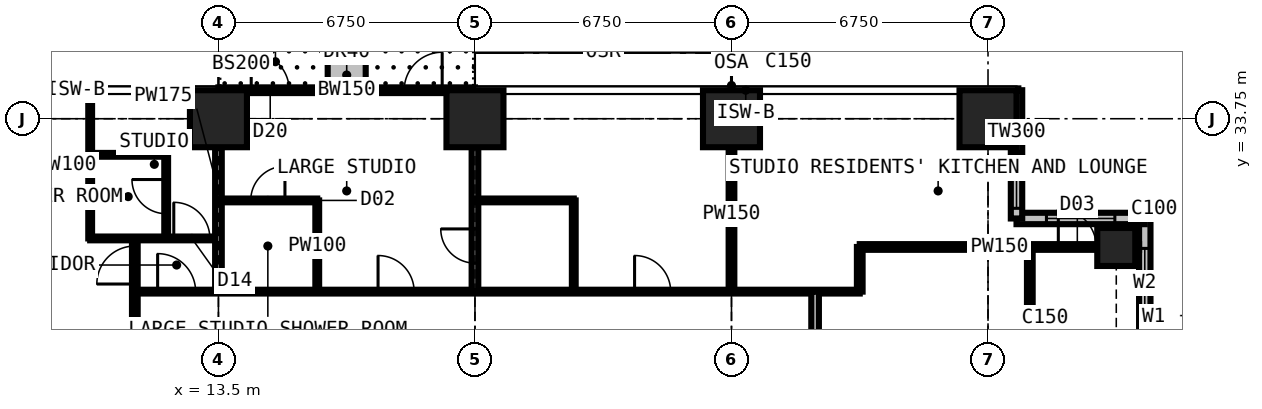
"""IFC4 building model, lengths in metres.
Left out: names, types, materials, properties, quantities, classifications, styles, units other than length and angle.
Written with IfcOpenShell. Run it as: python <this file> out.ifc"""

import sys

from ifc_helpers import new_model, si_unit, direction, frame, frame_2d, origin, origin_2d, place, context, subcontext, project, spatial, rectangle, extrude, element, fill, save


model = new_model("IFC4")
c1 = context("Model", 3, precision=1e-05, world=origin(), true_north=direction((0.0, 1.0)))
c2 = subcontext(c1, "Body", "Model", "MODEL_VIEW")
j1 = project(units=[si_unit("LENGTHUNIT", "METRE"), si_unit("PLANEANGLEUNIT", "RADIAN")], contexts=[c1])
p1 = place(None, origin())
s1 = spatial("IfcSite", under=j1, at=p1, CompositionType="ELEMENT")
p2 = place(p1, origin())
s2 = spatial("IfcBuilding", under=s1, at=p2, CompositionType="ELEMENT")
p3 = place(p2, frame((0.0, 0.0, 123.3)))
s3 = spatial("IfcBuildingStorey", under=s2, at=p3, CompositionType="ELEMENT", Elevation=123.3)
for number, where, z_axis, x_axis in (
    (1, (13.5, 33.75, 0.0), (0.0, 0.0, 1.0), (1.0, 0.0, 0.0)),
    (2, (20.25, 33.75, 0.0), (0.0, 0.0, 1.0), (1.0, 0.0, 0.0)),
    (3, (27.0, 33.75, 0.0), (0.0, 0.0, 1.0), (1.0, 0.0, 0.0)),
    (4, (33.75, 33.75, 0.0), (0.0, 0.0, 1.0), (1.0, 0.0, 0.0)),
):
    element("IfcColumn", number, at=place(p3, frame(where, z_axis=z_axis, x_axis=x_axis)), inside=s3, PredefinedType="COLUMN", context=c2, shape_type="SweptSolid", body=[
        extrude(rectangle(XDim=1.5, YDim=1.5, at=origin_2d()), origin(), (0.0, 0.0, 1.0), 3.6),
    ])
p4 = place(p3, frame((37.125, 30.375, 0.0), z_axis=(0.0, 0.0, 1.0), x_axis=(1.0, 0.0, 0.0)))
e5 = element("IfcColumn", 5, at=p4, inside=s3, PredefinedType="COLUMN", context=c2, shape_type="SweptSolid", body=[
    extrude(rectangle(XDim=1.0, YDim=1.0, at=origin_2d()), origin(), (0.0, 0.0, 1.0), 3.6),
])
p5 = place(p3, frame((37.875, 27.75, 0.0), z_axis=(0.0, 0.0, 1.0), x_axis=(0.0, 1.0, 0.0)))
e6 = element("IfcWall", 6, at=p5, inside=s3, PredefinedType="SOLIDWALL", context=c2, shape_type="SweptSolid", body=[
    extrude(rectangle(XDim=3.375, YDim=0.3, at=frame_2d((1.688, 0.0))), origin(), (0.0, 0.0, 1.0), 3.375),
])
p6 = place(p5, frame((0.788, 0.0, 0.6)))
e7 = element("IfcOpeningElement", 7, at=p6, cuts=e6, PredefinedType="OPENING", context=c2, shape_type="SweptSolid", body=[
    extrude(rectangle(XDim=1.8, YDim=2.1, at=frame_2d((0.9, 1.05))), frame((0.0, 0.16, 0.0), z_axis=(0.0, -1.0, 0.0), x_axis=(1.0, 0.0, 0.0)), (0.0, 0.0, 1.0), 0.32),
])
p7 = place(p3, frame((37.875, 31.125, 0.0), z_axis=(0.0, 0.0, 1.0), x_axis=(-1.0, 0.0, 0.0)))
e8 = element("IfcWall", 8, at=p7, inside=s3, PredefinedType="SOLIDWALL", context=c2, shape_type="SweptSolid", body=[
    extrude(rectangle(XDim=3.375, YDim=0.3, at=frame_2d((1.688, 0.0))), origin(), (0.0, 0.0, 1.0), 3.375),
])
p8 = place(p7, frame((0.788, 0.0, 0.6)))
e9 = element("IfcOpeningElement", 9, at=p8, cuts=e8, PredefinedType="OPENING", context=c2, shape_type="SweptSolid", body=[
    extrude(rectangle(XDim=1.8, YDim=2.1, at=frame_2d((0.9, 1.05))), frame((0.0, 0.16, 0.0), z_axis=(0.0, -1.0, 0.0), x_axis=(1.0, 0.0, 0.0)), (0.0, 0.0, 1.0), 0.32),
])
p9 = place(p3, frame((34.5, 31.125, 0.0), z_axis=(0.0, 0.0, 1.0), x_axis=(0.0, 1.0, 0.0)))
e10 = element("IfcWall", 10, at=p9, inside=s3, PredefinedType="SOLIDWALL", context=c2, shape_type="SweptSolid", body=[
    extrude(rectangle(XDim=3.375, YDim=0.3, at=frame_2d((1.688, 0.0))), origin(), (0.0, 0.0, 1.0), 3.375),
])
p10 = place(p9, frame((0.268, 0.0, 0.9)))
e11 = element("IfcOpeningElement", 11, at=p10, cuts=e10, PredefinedType="OPENING", context=c2, shape_type="SweptSolid", body=[
    extrude(rectangle(XDim=1.5, YDim=1.8, at=frame_2d((0.75, 0.9))), frame((0.0, 0.16, 0.0), z_axis=(0.0, -1.0, 0.0), x_axis=(1.0, 0.0, 0.0)), (0.0, 0.0, 1.0), 0.32),
])
p11 = place(p3, frame((13.5, 34.5, 0.0), z_axis=(0.0, 0.0, 1.0), x_axis=(1.0, 0.0, 0.0)))
e12 = element("IfcWall", 12, at=p11, inside=s3, PredefinedType="SOLIDWALL", context=c2, shape_type="SweptSolid", body=[
    extrude(rectangle(XDim=6.75, YDim=0.15, at=frame_2d((3.375, 0.0))), origin(), (0.0, 0.0, 1.0), 3.375),
])
p12 = place(p11, frame((0.863, 0.0, 0.0)))
e13 = element("IfcOpeningElement", 13, at=p12, cuts=e12, PredefinedType="OPENING", context=c2, shape_type="SweptSolid", body=[
    extrude(rectangle(XDim=1.0, YDim=2.2, at=frame_2d((0.5, 1.1))), frame((0.0, 0.085, 0.0), z_axis=(0.0, -1.0, 0.0), x_axis=(1.0, 0.0, 0.0)), (0.0, 0.0, 1.0), 0.17),
])
p13 = place(p11, frame((1.975, 0.0, 0.9)))
e14 = element("IfcOpeningElement", 14, at=p13, cuts=e12, PredefinedType="OPENING", context=c2, shape_type="SweptSolid", body=[
    extrude(rectangle(XDim=1.2, YDim=1.8, at=frame_2d((0.6, 0.9))), frame((0.0, 0.085, 0.0), z_axis=(0.0, -1.0, 0.0), x_axis=(1.0, 0.0, 0.0)), (0.0, 0.0, 1.0), 0.17),
])
p14 = place(p11, frame((4.887, 0.0, 0.0)))
e15 = element("IfcOpeningElement", 15, at=p14, cuts=e12, PredefinedType="OPENING", context=c2, shape_type="SweptSolid", body=[
    extrude(rectangle(XDim=1.0, YDim=2.2, at=frame_2d((0.5, 1.1))), frame((0.0, 0.085, 0.0), z_axis=(0.0, -1.0, 0.0), x_axis=(1.0, 0.0, 0.0)), (0.0, 0.0, 1.0), 0.17),
])
p15 = place(p11, frame((3.575, 0.0, 0.9)))
e16 = element("IfcOpeningElement", 16, at=p15, cuts=e12, PredefinedType="OPENING", context=c2, shape_type="SweptSolid", body=[
    extrude(rectangle(XDim=1.2, YDim=1.8, at=frame_2d((0.6, 0.9))), frame((0.0, 0.085, 0.0), z_axis=(0.0, -1.0, 0.0), x_axis=(1.0, 0.0, 0.0)), (0.0, 0.0, 1.0), 0.17),
])
p16 = place(p3, frame((16.875, 34.6, 0.0), z_axis=(0.0, 0.0, 1.0), x_axis=(0.0, 1.0, 0.0)))
e17 = element("IfcWall", 17, at=p16, inside=s3, PredefinedType="USERDEFINED", context=c2, shape_type="SweptSolid", body=[
    extrude(rectangle(XDim=2.2, YDim=1.0, at=frame_2d((1.1, 0.0))), origin(), (0.0, 0.0, 1.0), 0.9),
])
p17 = place(p3, frame((10.125, 30.6, 0.0), z_axis=(0.0, 0.0, 1.0), x_axis=(0.0, 1.0, 0.0)))
e18 = element("IfcWall", 18, at=p17, inside=s3, PredefinedType="PARTITIONING", context=c2, shape_type="SweptSolid", body=[
    extrude(rectangle(XDim=3.884, YDim=0.1, at=frame_2d((1.942, 0.0))), origin(), (0.0, 0.0, 1.0), 3.375),
])
p18 = place(p3, frame((10.125, 30.6, 0.0), z_axis=(0.0, 0.0, 1.0), x_axis=(1.0, 0.0, 0.0)))
e19 = element("IfcWall", 19, at=p18, inside=s3, PredefinedType="PARTITIONING", context=c2, shape_type="SweptSolid", body=[
    extrude(rectangle(XDim=3.375, YDim=0.1, at=frame_2d((1.688, 0.0))), origin(), (0.0, 0.0, 1.0), 3.375),
])
p19 = place(p18, frame((2.2, 0.0, 0.0)))
e20 = element("IfcOpeningElement", 20, at=p19, cuts=e19, PredefinedType="OPENING", context=c2, shape_type="SweptSolid", body=[
    extrude(rectangle(XDim=0.95, YDim=2.2, at=frame_2d((0.475, 1.1))), frame((0.0, 0.06, 0.0), z_axis=(0.0, -1.0, 0.0), x_axis=(1.0, 0.0, 0.0)), (0.0, 0.0, 1.0), 0.12),
])
p20 = place(p3, frame((10.125, 32.8, 0.0), z_axis=(0.0, 0.0, 1.0), x_axis=(1.0, 0.0, 0.0)))
e21 = element("IfcWall", 21, at=p20, inside=s3, PredefinedType="PARTITIONING", context=c2, shape_type="SweptSolid", body=[
    extrude(rectangle(XDim=2.0, YDim=0.1, at=frame_2d((1.0, 0.0))), origin(), (0.0, 0.0, 1.0), 3.375),
])
p21 = place(p3, frame((11.3, 11.3, 0.0), z_axis=(0.0, 0.0, 1.0), x_axis=(0.0, 1.0, 0.0)))
e22 = element("IfcWall", 22, at=p21, inside=s3, PredefinedType="PARTITIONING", context=c2, shape_type="SweptSolid", body=[
    extrude(rectangle(XDim=19.3, YDim=0.15, at=frame_2d((9.65, 0.0))), origin(), (0.0, 0.0, 1.0), 3.375),
])
p22 = place(p21, frame((18.1, 0.0, 0.0)))
e23 = element("IfcOpeningElement", 23, at=p22, cuts=e22, PredefinedType="OPENING", context=c2, shape_type="SweptSolid", body=[
    extrude(rectangle(XDim=1.0, YDim=2.2, at=frame_2d((0.5, 1.1))), frame((0.0, 0.085, 0.0), z_axis=(0.0, -1.0, 0.0), x_axis=(1.0, 0.0, 0.0)), (0.0, 0.0, 1.0), 0.17),
])
p23 = place(p21, frame((10.137, 0.0, 0.0)))
e24 = element("IfcOpeningElement", 24, at=p23, cuts=e22, PredefinedType="OPENING", context=c2, shape_type="SweptSolid", body=[
    extrude(rectangle(XDim=1.0, YDim=2.2, at=frame_2d((0.5, 1.1))), frame((0.0, 0.085, 0.0), z_axis=(0.0, -1.0, 0.0), x_axis=(1.0, 0.0, 0.0)), (0.0, 0.0, 1.0), 0.17),
])
p24 = place(p3, frame((11.3, 29.2, 0.0), z_axis=(0.0, 0.0, 1.0), x_axis=(1.0, 0.0, 0.0)))
e25 = element("IfcWall", 25, at=p24, inside=s3, PredefinedType="PARTITIONING", context=c2, shape_type="SweptSolid", body=[
    extrude(rectangle(XDim=19.075, YDim=0.1, at=frame_2d((9.538, 0.0))), origin(), (0.0, 0.0, 1.0), 3.375),
])
p25 = place(p24, frame((6.4, 0.0, 0.0)))
e26 = element("IfcOpeningElement", 26, at=p25, cuts=e25, PredefinedType="OPENING", context=c2, shape_type="SweptSolid", body=[
    extrude(rectangle(XDim=0.95, YDim=2.2, at=frame_2d((0.475, 1.1))), frame((0.0, 0.06, 0.0), z_axis=(0.0, -1.0, 0.0), x_axis=(1.0, 0.0, 0.0)), (0.0, 0.0, 1.0), 0.12),
])
p26 = place(p24, frame((13.15, 0.0, 0.0)))
e27 = element("IfcOpeningElement", 27, at=p26, cuts=e25, PredefinedType="OPENING", context=c2, shape_type="SweptSolid", body=[
    extrude(rectangle(XDim=0.95, YDim=2.2, at=frame_2d((0.475, 1.1))), frame((0.0, 0.06, 0.0), z_axis=(0.0, -1.0, 0.0), x_axis=(1.0, 0.0, 0.0)), (0.0, 0.0, 1.0), 0.12),
])
p27 = place(p24, frame((0.6, 0.0, 0.0)))
e28 = element("IfcOpeningElement", 28, at=p27, cuts=e25, PredefinedType="OPENING", context=c2, shape_type="SweptSolid", body=[
    extrude(rectangle(XDim=1.0, YDim=2.2, at=frame_2d((0.5, 1.1))), frame((0.0, 0.06, 0.0), z_axis=(0.0, -1.0, 0.0), x_axis=(1.0, 0.0, 0.0)), (0.0, 0.0, 1.0), 0.12),
])
p28 = place(p3, frame((12.125, 30.6, 0.0), z_axis=(0.0, 0.0, 1.0), x_axis=(0.0, 1.0, 0.0)))
e29 = element("IfcWall", 29, at=p28, inside=s3, PredefinedType="PARTITIONING", context=c2, shape_type="SweptSolid", body=[
    extrude(rectangle(XDim=2.2, YDim=0.1, at=frame_2d((1.1, 0.0))), origin(), (0.0, 0.0, 1.0), 3.375),
])
p29 = place(p28, frame((0.65, 0.0, 0.0)))
e30 = element("IfcOpeningElement", 30, at=p29, cuts=e29, PredefinedType="OPENING", context=c2, shape_type="SweptSolid", body=[
    extrude(rectangle(XDim=0.9, YDim=2.2, at=frame_2d((0.45, 1.1))), frame((0.0, 0.06, 0.0), z_axis=(0.0, -1.0, 0.0), x_axis=(1.0, 0.0, 0.0)), (0.0, 0.0, 1.0), 0.12),
])
p30 = place(p3, frame((13.5, 29.2, 0.0), z_axis=(0.0, 0.0, 1.0), x_axis=(0.0, 1.0, 0.0)))
e31 = element("IfcWall", 31, at=p30, inside=s3, PredefinedType="PARTITIONING", context=c2, shape_type="SweptSolid", body=[
    extrude(rectangle(XDim=5.284, YDim=0.175, at=frame_2d((2.642, 0.0))), origin(), (0.0, 0.0, 1.0), 2.806),
])
p31 = place(p3, frame((13.5, 31.6, 0.0), z_axis=(0.0, 0.0, 1.0), x_axis=(1.0, 0.0, 0.0)))
e32 = element("IfcWall", 32, at=p31, inside=s3, PredefinedType="PARTITIONING", context=c2, shape_type="SweptSolid", body=[
    extrude(rectangle(XDim=2.6, YDim=0.1, at=frame_2d((1.3, 0.0))), origin(), (0.0, 0.0, 1.0), 3.375),
])
p32 = place(p31, frame((0.85, 0.0, 0.0)))
e33 = element("IfcOpeningElement", 33, at=p32, cuts=e32, PredefinedType="OPENING", context=c2, shape_type="SweptSolid", body=[
    extrude(rectangle(XDim=0.9, YDim=2.2, at=frame_2d((0.45, 1.1))), frame((0.0, 0.06, 0.0), z_axis=(0.0, -1.0, 0.0), x_axis=(1.0, 0.0, 0.0)), (0.0, 0.0, 1.0), 0.12),
])
p33 = place(p3, frame((16.1, 29.2, 0.0), z_axis=(0.0, 0.0, 1.0), x_axis=(0.0, 1.0, 0.0)))
e34 = element("IfcWall", 34, at=p33, inside=s3, PredefinedType="PARTITIONING", context=c2, shape_type="SweptSolid", body=[
    extrude(rectangle(XDim=2.4, YDim=0.1, at=frame_2d((1.2, 0.0))), origin(), (0.0, 0.0, 1.0), 3.375),
])
p34 = place(p3, frame((20.25, 29.2, 0.0), z_axis=(0.0, 0.0, 1.0), x_axis=(0.0, 1.0, 0.0)))
e35 = element("IfcWall", 35, at=p34, inside=s3, PredefinedType="PARTITIONING", context=c2, shape_type="SweptSolid", body=[
    extrude(rectangle(XDim=5.284, YDim=0.175, at=frame_2d((2.642, 0.0))), origin(), (0.0, 0.0, 1.0), 2.61),
])
p35 = place(p34, frame((0.75, 0.0, 0.0)))
e36 = element("IfcOpeningElement", 36, at=p35, cuts=e35, PredefinedType="OPENING", context=c2, shape_type="SweptSolid", body=[
    extrude(rectangle(XDim=0.9, YDim=2.2, at=frame_2d((0.45, 1.1))), frame((0.0, 0.097, 0.0), z_axis=(0.0, -1.0, 0.0), x_axis=(1.0, 0.0, 0.0)), (0.0, 0.0, 1.0), 0.195),
])
p36 = place(p3, frame((20.25, 31.6, 0.0), z_axis=(0.0, 0.0, 1.0), x_axis=(1.0, 0.0, 0.0)))
e37 = element("IfcWall", 37, at=p36, inside=s3, PredefinedType="PARTITIONING", context=c2, shape_type="SweptSolid", body=[
    extrude(rectangle(XDim=2.6, YDim=0.1, at=frame_2d((1.3, 0.0))), origin(), (0.0, 0.0, 1.0), 3.375),
])
p37 = place(p3, frame((22.85, 29.2, 0.0), z_axis=(0.0, 0.0, 1.0), x_axis=(0.0, 1.0, 0.0)))
e38 = element("IfcWall", 38, at=p37, inside=s3, PredefinedType="PARTITIONING", context=c2, shape_type="SweptSolid", body=[
    extrude(rectangle(XDim=2.4, YDim=0.1, at=frame_2d((1.2, 0.0))), origin(), (0.0, 0.0, 1.0), 3.375),
])
p38 = place(p3, frame((27.0, 29.2, 0.0), z_axis=(0.0, 0.0, 1.0), x_axis=(0.0, 1.0, 0.0)))
e39 = element("IfcWall", 39, at=p38, inside=s3, PredefinedType="PARTITIONING", context=c2, shape_type="SweptSolid", body=[
    extrude(rectangle(XDim=5.284, YDim=0.15, at=frame_2d((2.642, 0.0))), origin(), (0.0, 0.0, 1.0), 2.61),
])
p39 = place(p3, frame((29.2, 11.3, 0.0), z_axis=(0.0, 0.0, 1.0), x_axis=(0.0, 1.0, 0.0)))
e40 = element("IfcWall", 40, at=p39, inside=s3, PredefinedType="PARTITIONING", context=c2, shape_type="SweptSolid", body=[
    extrude(rectangle(XDim=17.9, YDim=0.2, at=frame_2d((8.95, 0.0))), origin(), (0.0, 0.0, 1.0), 3.375),
])
p40 = place(p39, frame((8.35, 0.0, 0.0)))
e41 = element("IfcOpeningElement", 41, at=p40, cuts=e40, PredefinedType="OPENING", context=c2, shape_type="SweptSolid", body=[
    extrude(rectangle(XDim=1.2, YDim=2.2, at=frame_2d((0.6, 1.1))), frame((0.0, 0.11, 0.0), z_axis=(0.0, -1.0, 0.0), x_axis=(1.0, 0.0, 0.0)), (0.0, 0.0, 1.0), 0.22),
])
p41 = place(p3, frame((30.375, 29.2, 0.0), z_axis=(0.0, 0.0, 1.0), x_axis=(0.0, 1.0, 0.0)))
e42 = element("IfcWall", 42, at=p41, inside=s3, PredefinedType="PARTITIONING", context=c2, shape_type="SweptSolid", body=[
    extrude(rectangle(XDim=1.175, YDim=0.15, at=frame_2d((0.587, 0.0))), origin(), (0.0, 0.0, 1.0), 3.375),
])
p42 = place(p3, frame((30.375, 30.375, 0.0), z_axis=(0.0, 0.0, 1.0), x_axis=(1.0, 0.0, 0.0)))
e43 = element("IfcWall", 43, at=p42, inside=s3, PredefinedType="PARTITIONING", context=c2, shape_type="SweptSolid", body=[
    extrude(rectangle(XDim=7.35, YDim=0.15, at=frame_2d((3.675, 0.0))), origin(), (0.0, 0.0, 1.0), 2.877),
])
p43 = place(p42, frame((5.225, 0.0, 0.0)))
e44 = element("IfcOpeningElement", 44, at=p43, cuts=e43, PredefinedType="OPENING", context=c2, shape_type="SweptSolid", body=[
    extrude(rectangle(XDim=1.0, YDim=2.2, at=frame_2d((0.5, 1.1))), frame((0.0, 0.085, 0.0), z_axis=(0.0, -1.0, 0.0), x_axis=(1.0, 0.0, 0.0)), (0.0, 0.0, 1.0), 0.17),
])
p44 = place(p3, frame((34.85, 12.55, 0.0), z_axis=(0.0, 0.0, 1.0), x_axis=(0.0, 1.0, 0.0)))
e45 = element("IfcWall", 45, at=p44, inside=s3, PredefinedType="PARTITIONING", context=c2, shape_type="SweptSolid", body=[
    extrude(rectangle(XDim=17.825, YDim=0.15, at=frame_2d((8.913, 0.0))), origin(), (0.0, 0.0, 1.0), 3.375),
])
p45 = place(p44, frame((8.5, 0.0, 0.0)))
e46 = element("IfcOpeningElement", 46, at=p45, cuts=e45, PredefinedType="OPENING", context=c2, shape_type="SweptSolid", body=[
    extrude(rectangle(XDim=0.95, YDim=2.2, at=frame_2d((0.475, 1.1))), frame((0.0, 0.085, 0.0), z_axis=(0.0, -1.0, 0.0), x_axis=(1.0, 0.0, 0.0)), (0.0, 0.0, 1.0), 0.17),
])
p46 = place(p6, origin())
e47 = element("IfcWindow", 47, at=p46, inside=s3, PartitioningType="SINGLE_PANEL", PredefinedType="WINDOW", context=c2, shape_type="SweptSolid", body=[
    extrude(rectangle(XDim=1.8, YDim=2.1, at=frame_2d((0.9, 1.05))), frame((0.0, 0.03, 0.0), z_axis=(0.0, -1.0, 0.0), x_axis=(1.0, 0.0, 0.0)), (0.0, 0.0, 1.0), 0.06),
])
fill(e7, e47)
p47 = place(p8, origin())
e48 = element("IfcWindow", 48, at=p47, inside=s3, PartitioningType="SINGLE_PANEL", PredefinedType="WINDOW", context=c2, shape_type="SweptSolid", body=[
    extrude(rectangle(XDim=1.8, YDim=2.1, at=frame_2d((0.9, 1.05))), frame((0.0, 0.03, 0.0), z_axis=(0.0, -1.0, 0.0), x_axis=(1.0, 0.0, 0.0)), (0.0, 0.0, 1.0), 0.06),
])
fill(e9, e48)
p48 = place(p10, origin())
e49 = element("IfcWindow", 49, at=p48, inside=s3, PartitioningType="SINGLE_PANEL", PredefinedType="WINDOW", context=c2, shape_type="SweptSolid", body=[
    extrude(rectangle(XDim=1.5, YDim=1.8, at=frame_2d((0.75, 0.9))), frame((0.0, 0.03, 0.0), z_axis=(0.0, -1.0, 0.0), x_axis=(1.0, 0.0, 0.0)), (0.0, 0.0, 1.0), 0.06),
])
fill(e11, e49)
p49 = place(p12, origin())
e50 = element("IfcDoor", 50, at=p49, inside=s3, OperationType="SINGLE_SWING_LEFT", PredefinedType="DOOR", context=c2, shape_type="SweptSolid", body=[
    extrude(rectangle(XDim=1.0, YDim=2.2, at=frame_2d((0.5, 1.1))), frame((0.0, 0.025, 0.0), z_axis=(0.0, -1.0, 0.0), x_axis=(1.0, 0.0, 0.0)), (0.0, 0.0, 1.0), 0.05),
])
fill(e13, e50)
p50 = place(p13, origin())
e51 = element("IfcWindow", 51, at=p50, inside=s3, PartitioningType="SINGLE_PANEL", PredefinedType="WINDOW", context=c2, shape_type="SweptSolid", body=[
    extrude(rectangle(XDim=1.2, YDim=1.8, at=frame_2d((0.6, 0.9))), frame((0.0, 0.03, 0.0), z_axis=(0.0, -1.0, 0.0), x_axis=(1.0, 0.0, 0.0)), (0.0, 0.0, 1.0), 0.06),
])
fill(e14, e51)
p51 = place(p14, origin())
e52 = element("IfcDoor", 52, at=p51, inside=s3, OperationType="SINGLE_SWING_RIGHT", PredefinedType="DOOR", context=c2, shape_type="SweptSolid", body=[
    extrude(rectangle(XDim=1.0, YDim=2.2, at=frame_2d((0.5, 1.1))), frame((0.0, 0.025, 0.0), z_axis=(0.0, -1.0, 0.0), x_axis=(1.0, 0.0, 0.0)), (0.0, 0.0, 1.0), 0.05),
])
fill(e15, e52)
p52 = place(p15, origin())
e53 = element("IfcWindow", 53, at=p52, inside=s3, PartitioningType="SINGLE_PANEL", PredefinedType="WINDOW", context=c2, shape_type="SweptSolid", body=[
    extrude(rectangle(XDim=1.2, YDim=1.8, at=frame_2d((0.6, 0.9))), frame((0.0, 0.03, 0.0), z_axis=(0.0, -1.0, 0.0), x_axis=(1.0, 0.0, 0.0)), (0.0, 0.0, 1.0), 0.06),
])
fill(e16, e53)
p53 = place(p43, origin())
e54 = element("IfcDoor", 54, at=p53, inside=s3, OperationType="SINGLE_SWING_LEFT", PredefinedType="DOOR", context=c2, shape_type="SweptSolid", body=[
    extrude(rectangle(XDim=1.0, YDim=2.2, at=frame_2d((0.5, 1.1))), frame((0.0, 0.025, 0.0), z_axis=(0.0, -1.0, 0.0), x_axis=(1.0, 0.0, 0.0)), (0.0, 0.0, 1.0), 0.05),
])
fill(e44, e54)
p54 = place(p25, origin())
e55 = element("IfcDoor", 55, at=p54, inside=s3, OperationType="SINGLE_SWING_LEFT", PredefinedType="DOOR", context=c2, shape_type="SweptSolid", body=[
    extrude(rectangle(XDim=0.95, YDim=2.2, at=frame_2d((0.475, 1.1))), frame((0.0, 0.025, 0.0), z_axis=(0.0, -1.0, 0.0), x_axis=(1.0, 0.0, 0.0)), (0.0, 0.0, 1.0), 0.05),
])
fill(e26, e55)
p55 = place(p32, origin())
e56 = element("IfcDoor", 56, at=p55, inside=s3, OperationType="SINGLE_SWING_RIGHT", PredefinedType="DOOR", context=c2, shape_type="SweptSolid", body=[
    extrude(rectangle(XDim=0.9, YDim=2.2, at=frame_2d((0.45, 1.1))), frame((0.0, 0.025, 0.0), z_axis=(0.0, -1.0, 0.0), x_axis=(1.0, 0.0, 0.0)), (0.0, 0.0, 1.0), 0.05),
])
fill(e33, e56)
p56 = place(p26, origin())
e57 = element("IfcDoor", 57, at=p56, inside=s3, OperationType="SINGLE_SWING_LEFT", PredefinedType="DOOR", context=c2, shape_type="SweptSolid", body=[
    extrude(rectangle(XDim=0.95, YDim=2.2, at=frame_2d((0.475, 1.1))), frame((0.0, 0.025, 0.0), z_axis=(0.0, -1.0, 0.0), x_axis=(1.0, 0.0, 0.0)), (0.0, 0.0, 1.0), 0.05),
])
fill(e27, e57)
p57 = place(p35, origin())
e58 = element("IfcDoor", 58, at=p57, inside=s3, OperationType="SINGLE_SWING_RIGHT", PredefinedType="DOOR", context=c2, shape_type="SweptSolid", body=[
    extrude(rectangle(XDim=0.9, YDim=2.2, at=frame_2d((0.45, 1.1))), frame((0.0, 0.025, 0.0), z_axis=(0.0, -1.0, 0.0), x_axis=(1.0, 0.0, 0.0)), (0.0, 0.0, 1.0), 0.05),
])
fill(e36, e58)
p58 = place(p19, origin())
e59 = element("IfcDoor", 59, at=p58, inside=s3, OperationType="SINGLE_SWING_LEFT", PredefinedType="DOOR", context=c2, shape_type="SweptSolid", body=[
    extrude(rectangle(XDim=0.95, YDim=2.2, at=frame_2d((0.475, 1.1))), frame((0.0, 0.025, 0.0), z_axis=(0.0, -1.0, 0.0), x_axis=(1.0, 0.0, 0.0)), (0.0, 0.0, 1.0), 0.05),
])
fill(e20, e59)
p59 = place(p29, origin())
e60 = element("IfcDoor", 60, at=p59, inside=s3, OperationType="SINGLE_SWING_RIGHT", PredefinedType="DOOR", context=c2, shape_type="SweptSolid", body=[
    extrude(rectangle(XDim=0.9, YDim=2.2, at=frame_2d((0.45, 1.1))), frame((0.0, 0.025, 0.0), z_axis=(0.0, -1.0, 0.0), x_axis=(1.0, 0.0, 0.0)), (0.0, 0.0, 1.0), 0.05),
])
fill(e30, e60)
p60 = place(p27, origin())
e61 = element("IfcDoor", 61, at=p60, inside=s3, OperationType="SINGLE_SWING_LEFT", PredefinedType="DOOR", context=c2, shape_type="SweptSolid", body=[
    extrude(rectangle(XDim=1.0, YDim=2.2, at=frame_2d((0.5, 1.1))), frame((0.0, 0.025, 0.0), z_axis=(0.0, -1.0, 0.0), x_axis=(1.0, 0.0, 0.0)), (0.0, 0.0, 1.0), 0.05),
])
fill(e28, e61)
p61 = place(p22, origin())
e62 = element("IfcDoor", 62, at=p61, inside=s3, OperationType="SINGLE_SWING_LEFT", PredefinedType="DOOR", context=c2, shape_type="SweptSolid", body=[
    extrude(rectangle(XDim=1.0, YDim=2.2, at=frame_2d((0.5, 1.1))), frame((0.0, 0.025, 0.0), z_axis=(0.0, -1.0, 0.0), x_axis=(1.0, 0.0, 0.0)), (0.0, 0.0, 1.0), 0.05),
])
fill(e23, e62)
save(model, sys.argv[1])
